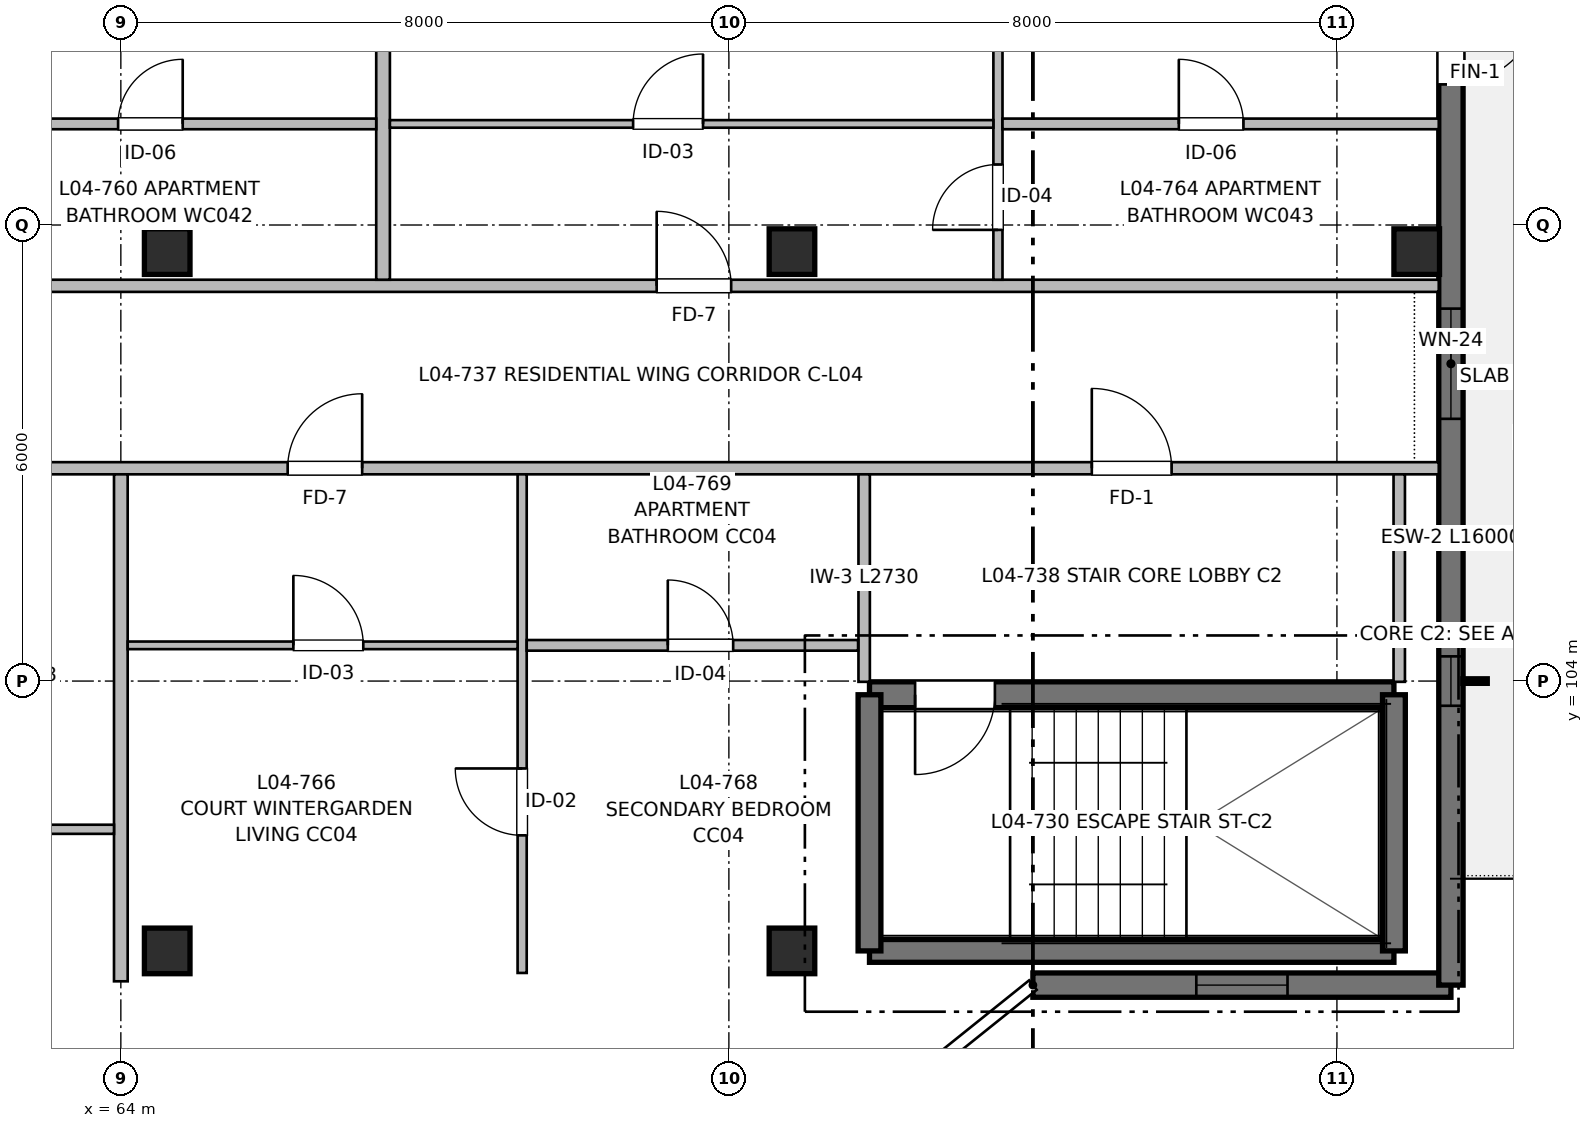
"""IFC4 building model, lengths in metres.
Left out: names, types, materials, properties, quantities, classifications, styles, units other than length and angle.
Written with IfcOpenShell. Run it as: python <this file> out.ifc"""

import sys

from ifc_helpers import new_model, si_unit, direction, frame, frame_2d, origin, origin_2d, place, context, subcontext, project, spatial, rectangle, extrude, element, fill, save


model = new_model("IFC4")
c1 = context("Model", 3, precision=1e-05, world=origin(), true_north=direction((0.0, 1.0)))
c2 = subcontext(c1, "Body", "Model", "MODEL_VIEW")
j1 = project(units=[si_unit("LENGTHUNIT", "METRE"), si_unit("PLANEANGLEUNIT", "RADIAN")], contexts=[c1])
p1 = place(None, origin())
s1 = spatial("IfcSite", under=j1, at=p1, CompositionType="ELEMENT")
p2 = place(p1, origin())
s2 = spatial("IfcBuilding", under=s1, at=p2, CompositionType="ELEMENT")
p3 = place(p2, frame((0.0, 0.0, 13.76)))
s3 = spatial("IfcBuildingStorey", under=s2, at=p3, CompositionType="ELEMENT", Elevation=13.76)
for number, where, z_axis, x_axis in (
    (1, (64.61, 100.45, 0.0), (0.0, 0.0, 1.0), (1.0, 0.0, 0.0)),
    (2, (64.61, 109.65, 0.0), (0.0, 0.0, 1.0), (1.0, 0.0, 0.0)),
    (3, (72.83, 100.45, 0.0), (0.0, 0.0, 1.0), (1.0, 0.0, 0.0)),
    (4, (72.83, 109.65, 0.0), (0.0, 0.0, 1.0), (1.0, 0.0, 0.0)),
    (5, (81.05, 109.65, 0.0), (0.0, 0.0, 1.0), (1.0, 0.0, 0.0)),
):
    element("IfcColumn", number, at=place(p3, frame(where, z_axis=z_axis, x_axis=x_axis)), inside=s3, PredefinedType="COLUMN", context=c2, shape_type="SweptSolid", body=[
        extrude(rectangle(XDim=0.6, YDim=0.6, at=origin_2d()), origin(), (0.0, 0.0, 1.0), 3.2),
    ])
p4 = place(p3, frame((73.85, 100.45, 0.0), z_axis=(0.0, 0.0, 1.0), x_axis=(1.0, 0.0, 0.0)))
e6 = element("IfcWall", 6, at=p4, inside=s3, PredefinedType="SHEAR", context=c2, shape_type="SweptSolid", body=[
    extrude(rectangle(XDim=6.9, YDim=0.3, at=frame_2d((3.45, 0.0))), origin(), (0.0, 0.0, 1.0), 3.2),
])
p5 = place(p3, frame((80.75, 103.82, 0.0), z_axis=(0.0, 0.0, 1.0), x_axis=(-1.0, 0.0, 0.0)))
e7 = element("IfcWall", 7, at=p5, inside=s3, PredefinedType="SHEAR", context=c2, shape_type="SweptSolid", body=[
    extrude(rectangle(XDim=6.9, YDim=0.34, at=frame_2d((3.45, 0.0))), origin(), (0.0, 0.0, 1.0), 3.2),
])
p6 = place(p5, frame((5.25, 0.0, 0.0)))
e8 = element("IfcOpeningElement", 8, at=p6, cuts=e7, PredefinedType="OPENING", context=c2, shape_type="SweptSolid", body=[
    extrude(rectangle(XDim=1.05, YDim=2.15, at=frame_2d((0.525, 1.075))), frame((0.0, 0.18, 0.0), z_axis=(0.0, -1.0, 0.0), x_axis=(1.0, 0.0, 0.0)), (0.0, 0.0, 1.0), 0.36),
])
for number, where, z_axis, x_axis in (
    (9, (73.85, 103.82, 0.0), (0.0, 0.0, 1.0), (0.0, -1.0, 0.0)),
    (10, (80.75, 100.45, 0.0), (0.0, 0.0, 1.0), (0.0, 1.0, 0.0)),
):
    element("IfcWall", number, at=place(p3, frame(where, z_axis=z_axis, x_axis=x_axis)), inside=s3, PredefinedType="SHEAR", context=c2, shape_type="SweptSolid", body=[
        extrude(rectangle(XDim=3.37, YDim=0.3, at=frame_2d((1.685, 0.0))), origin(), (0.0, 0.0, 1.0), 3.2),
    ])
p7 = place(p3, frame((81.5, 100.0, 0.0), z_axis=(0.0, 0.0, 1.0), x_axis=(-1.0, 0.0, 0.0)))
e11 = element("IfcWall", 11, at=p7, inside=s3, PredefinedType="SHEAR", context=c2, shape_type="SweptSolid", body=[
    extrude(rectangle(XDim=5.5, YDim=0.32, at=frame_2d((2.75, 0.0))), origin(), (0.0, 0.0, 1.0), 2.98),
])
p8 = place(p7, frame((2.15, 0.0, 0.9)))
e12 = element("IfcOpeningElement", 12, at=p8, cuts=e11, PredefinedType="OPENING", context=c2, shape_type="SweptSolid", body=[
    extrude(rectangle(XDim=1.2, YDim=1.05, at=frame_2d((0.6, 0.525))), frame((0.0, 0.17, 0.0), z_axis=(0.0, -1.0, 0.0), x_axis=(1.0, 0.0, 0.0)), (0.0, 0.0, 1.0), 0.34),
])
p9 = place(p3, frame((81.5, 116.0, 0.0), z_axis=(0.0, 0.0, 1.0), x_axis=(0.0, -1.0, 0.0)))
e13 = element("IfcWall", 13, at=p9, inside=s3, PredefinedType="SHEAR", context=c2, shape_type="SweptSolid", body=[
    extrude(rectangle(XDim=16.0, YDim=0.32, at=frame_2d((8.0, 0.0))), origin(), (0.0, 0.0, 1.0), 2.98),
])
p10 = place(p9, frame((2.95, 0.0, 0.0)))
e14 = element("IfcOpeningElement", 14, at=p10, cuts=e13, PredefinedType="OPENING", context=c2, shape_type="SweptSolid", body=[
    extrude(rectangle(XDim=1.2, YDim=2.2, at=frame_2d((0.6, 1.1))), frame((0.0, 0.17, 0.0), z_axis=(0.0, -1.0, 0.0), x_axis=(1.0, 0.0, 0.0)), (0.0, 0.0, 1.0), 0.34),
])
p11 = place(p9, frame((7.1, 0.0, 0.77)))
e15 = element("IfcOpeningElement", 15, at=p11, cuts=e13, PredefinedType="OPENING", context=c2, shape_type="SweptSolid", body=[
    extrude(rectangle(XDim=1.45, YDim=1.45, at=frame_2d((0.725, 0.725))), frame((0.0, 0.17, 0.0), z_axis=(0.0, -1.0, 0.0), x_axis=(1.0, 0.0, 0.0)), (0.0, 0.0, 1.0), 0.34),
])
p12 = place(p9, frame((11.675, 0.0, 0.9)))
e16 = element("IfcOpeningElement", 16, at=p12, cuts=e13, PredefinedType="OPENING", context=c2, shape_type="SweptSolid", body=[
    extrude(rectangle(XDim=0.65, YDim=0.95, at=frame_2d((0.325, 0.475))), frame((0.0, 0.17, 0.0), z_axis=(0.0, -1.0, 0.0), x_axis=(1.0, 0.0, 0.0)), (0.0, 0.0, 1.0), 0.34),
])
p13 = place(p3, frame((57.2, 106.8, 0.0), z_axis=(0.0, 0.0, 1.0), x_axis=(1.0, 0.0, 0.0)))
e17 = element("IfcWall", 17, at=p13, inside=s3, PredefinedType="PARTITIONING", context=c2, shape_type="SweptSolid", body=[
    extrude(rectangle(XDim=24.14, YDim=0.16, at=frame_2d((12.07, 0.0))), origin(), (0.0, 0.0, 1.0), 2.935),
])
p14 = place(p13, frame((19.575, 0.0, 0.0)))
e18 = element("IfcOpeningElement", 18, at=p14, cuts=e17, PredefinedType="OPENING", context=c2, shape_type="SweptSolid", body=[
    extrude(rectangle(XDim=1.05, YDim=2.15, at=frame_2d((0.525, 1.075))), frame((0.0, 0.09, 0.0), z_axis=(0.0, -1.0, 0.0), x_axis=(1.0, 0.0, 0.0)), (0.0, 0.0, 1.0), 0.18),
])
p15 = place(p13, frame((8.995, 0.0, 0.0)))
e19 = element("IfcOpeningElement", 19, at=p15, cuts=e17, PredefinedType="OPENING", context=c2, shape_type="SweptSolid", body=[
    extrude(rectangle(XDim=0.98, YDim=2.15, at=frame_2d((0.49, 1.075))), frame((0.0, 0.09, 0.0), z_axis=(0.0, -1.0, 0.0), x_axis=(1.0, 0.0, 0.0)), (0.0, 0.0, 1.0), 0.18),
])
p16 = place(p3, frame((39.66, 109.2, 0.0), z_axis=(0.0, 0.0, 1.0), x_axis=(1.0, 0.0, 0.0)))
e20 = element("IfcWall", 20, at=p16, inside=s3, PredefinedType="PARTITIONING", context=c2, shape_type="SweptSolid", body=[
    extrude(rectangle(XDim=41.68, YDim=0.16, at=frame_2d((20.84, 0.0))), origin(), (0.0, 0.0, 1.0), 2.935),
])
p17 = place(p16, frame((3.51, 0.0, 0.0)))
e21 = element("IfcOpeningElement", 21, at=p17, cuts=e20, PredefinedType="OPENING", context=c2, shape_type="SweptSolid", body=[
    extrude(rectangle(XDim=0.98, YDim=2.15, at=frame_2d((0.49, 1.075))), frame((0.0, 0.09, 0.0), z_axis=(0.0, -1.0, 0.0), x_axis=(1.0, 0.0, 0.0)), (0.0, 0.0, 1.0), 0.18),
])
p18 = place(p16, frame((17.47, 0.0, 0.0)))
e22 = element("IfcOpeningElement", 22, at=p18, cuts=e20, PredefinedType="OPENING", context=c2, shape_type="SweptSolid", body=[
    extrude(rectangle(XDim=0.98, YDim=2.15, at=frame_2d((0.49, 1.075))), frame((0.0, 0.09, 0.0), z_axis=(0.0, -1.0, 0.0), x_axis=(1.0, 0.0, 0.0)), (0.0, 0.0, 1.0), 0.18),
])
p19 = place(p16, frame((31.39, 0.0, 0.0)))
e23 = element("IfcOpeningElement", 23, at=p19, cuts=e20, PredefinedType="OPENING", context=c2, shape_type="SweptSolid", body=[
    extrude(rectangle(XDim=0.98, YDim=2.15, at=frame_2d((0.49, 1.075))), frame((0.0, 0.09, 0.0), z_axis=(0.0, -1.0, 0.0), x_axis=(1.0, 0.0, 0.0)), (0.0, 0.0, 1.0), 0.18),
])
p20 = place(p3, frame((64.0, 100.05, 0.0), z_axis=(0.0, 0.0, 1.0), x_axis=(0.0, 1.0, 0.0)))
e24 = element("IfcWall", 24, at=p20, inside=s3, PredefinedType="PARTITIONING", context=c2, shape_type="SweptSolid", body=[
    extrude(rectangle(XDim=6.67, YDim=0.18, at=frame_2d((3.335, 0.0))), origin(), (0.0, 0.0, 1.0), 2.935),
])
for number, where, z_axis, x_axis in (
    (25, (73.78, 103.99, 0.0), (0.0, 0.0, 1.0), (0.0, 1.0, 0.0)),
    (26, (80.82, 103.99, 0.0), (0.0, 0.0, 1.0), (0.0, 1.0, 0.0)),
):
    element("IfcWall", number, at=place(p3, frame(where, z_axis=z_axis, x_axis=x_axis)), inside=s3, PredefinedType="PARTITIONING", context=c2, shape_type="SweptSolid", body=[
        extrude(rectangle(XDim=2.73, YDim=0.15, at=frame_2d((1.365, 0.0))), origin(), (0.0, 0.0, 1.0), 2.935),
    ])
p21 = place(p3, frame((59.72, 102.05, 0.0), z_axis=(0.0, 0.0, 1.0), x_axis=(1.0, 0.0, 0.0)))
e27 = element("IfcWall", 27, at=p21, inside=s3, PredefinedType="PARTITIONING", context=c2, shape_type="SweptSolid", body=[
    extrude(rectangle(XDim=4.19, YDim=0.12, at=frame_2d((2.095, 0.0))), origin(), (0.0, 0.0, 1.0), 2.935),
])
p22 = place(p21, frame((1.655, 0.0, 0.0)))
e28 = element("IfcOpeningElement", 28, at=p22, cuts=e27, PredefinedType="OPENING", context=c2, shape_type="SweptSolid", body=[
    extrude(rectangle(XDim=0.88, YDim=2.1, at=frame_2d((0.44, 1.05))), frame((0.0, 0.07, 0.0), z_axis=(0.0, -1.0, 0.0), x_axis=(1.0, 0.0, 0.0)), (0.0, 0.0, 1.0), 0.14),
])
p23 = place(p3, frame((67.45, 109.28, 0.0), z_axis=(0.0, 0.0, 1.0), x_axis=(0.0, 1.0, 0.0)))
e29 = element("IfcWall", 29, at=p23, inside=s3, PredefinedType="PARTITIONING", context=c2, shape_type="SweptSolid", body=[
    extrude(rectangle(XDim=6.6, YDim=0.18, at=frame_2d((3.3, 0.0))), origin(), (0.0, 0.0, 1.0), 2.935),
])
p24 = place(p3, frame((61.66, 111.33, 0.0), z_axis=(0.0, 0.0, 1.0), x_axis=(1.0, 0.0, 0.0)))
e30 = element("IfcWall", 30, at=p24, inside=s3, PredefinedType="PARTITIONING", context=c2, shape_type="SweptSolid", body=[
    extrude(rectangle(XDim=5.7, YDim=0.14, at=frame_2d((2.85, 0.0))), origin(), (0.0, 0.0, 1.0), 2.935),
])
p25 = place(p24, frame((2.304, 0.0, 0.0)))
e31 = element("IfcOpeningElement", 31, at=p25, cuts=e30, PredefinedType="OPENING", context=c2, shape_type="SweptSolid", body=[
    extrude(rectangle(XDim=0.85, YDim=2.05, at=frame_2d((0.425, 1.025))), frame((0.0, 0.08, 0.0), z_axis=(0.0, -1.0, 0.0), x_axis=(1.0, 0.0, 0.0)), (0.0, 0.0, 1.0), 0.16),
])
p26 = place(p3, frame((75.54, 109.28, 0.0), z_axis=(0.0, 0.0, 1.0), x_axis=(0.0, 1.0, 0.0)))
e32 = element("IfcWall", 32, at=p26, inside=s3, PredefinedType="PARTITIONING", context=c2, shape_type="SweptSolid", body=[
    extrude(rectangle(XDim=6.6, YDim=0.12, at=frame_2d((3.3, 0.0))), origin(), (0.0, 0.0, 1.0), 2.935),
])
p27 = place(p26, frame((0.656, 0.0, 0.0)))
e33 = element("IfcOpeningElement", 33, at=p27, cuts=e32, PredefinedType="OPENING", context=c2, shape_type="SweptSolid", body=[
    extrude(rectangle(XDim=0.86, YDim=2.1, at=frame_2d((0.43, 1.05))), frame((0.0, 0.07, 0.0), z_axis=(0.0, -1.0, 0.0), x_axis=(1.0, 0.0, 0.0)), (0.0, 0.0, 1.0), 0.14),
])
p28 = place(p26, frame((4.097, 0.0, 0.0)))
e34 = element("IfcOpeningElement", 34, at=p28, cuts=e32, PredefinedType="OPENING", context=c2, shape_type="SweptSolid", body=[
    extrude(rectangle(XDim=0.9, YDim=2.1, at=frame_2d((0.45, 1.05))), frame((0.0, 0.07, 0.0), z_axis=(0.0, -1.0, 0.0), x_axis=(1.0, 0.0, 0.0)), (0.0, 0.0, 1.0), 0.14),
])
p29 = place(p3, frame((75.6, 111.33, 0.0), z_axis=(0.0, 0.0, 1.0), x_axis=(1.0, 0.0, 0.0)))
e35 = element("IfcWall", 35, at=p29, inside=s3, PredefinedType="PARTITIONING", context=c2, shape_type="SweptSolid", body=[
    extrude(rectangle(XDim=5.74, YDim=0.14, at=frame_2d((2.87, 0.0))), origin(), (0.0, 0.0, 1.0), 2.935),
])
p30 = place(p29, frame((2.32, 0.0, 0.0)))
e36 = element("IfcOpeningElement", 36, at=p30, cuts=e35, PredefinedType="OPENING", context=c2, shape_type="SweptSolid", body=[
    extrude(rectangle(XDim=0.85, YDim=2.05, at=frame_2d((0.425, 1.025))), frame((0.0, 0.08, 0.0), z_axis=(0.0, -1.0, 0.0), x_axis=(1.0, 0.0, 0.0)), (0.0, 0.0, 1.0), 0.16),
])
p31 = place(p3, frame((67.54, 111.33, 0.0), z_axis=(0.0, 0.0, 1.0), x_axis=(1.0, 0.0, 0.0)))
e37 = element("IfcWall", 37, at=p31, inside=s3, PredefinedType="PARTITIONING", context=c2, shape_type="SweptSolid", body=[
    extrude(rectangle(XDim=7.94, YDim=0.1, at=frame_2d((3.97, 0.0))), origin(), (0.0, 0.0, 1.0), 2.935),
])
p32 = place(p31, frame((3.2, 0.0, 0.0)))
e38 = element("IfcOpeningElement", 38, at=p32, cuts=e37, PredefinedType="OPENING", context=c2, shape_type="SweptSolid", body=[
    extrude(rectangle(XDim=0.92, YDim=2.1, at=frame_2d((0.46, 1.05))), frame((0.0, 0.06, 0.0), z_axis=(0.0, -1.0, 0.0), x_axis=(1.0, 0.0, 0.0)), (0.0, 0.0, 1.0), 0.12),
])
p33 = place(p3, frame((69.28, 100.16, 0.0), z_axis=(0.0, 0.0, 1.0), x_axis=(0.0, 1.0, 0.0)))
e39 = element("IfcWall", 39, at=p33, inside=s3, PredefinedType="PARTITIONING", context=c2, shape_type="SweptSolid", body=[
    extrude(rectangle(XDim=6.56, YDim=0.12, at=frame_2d((3.28, 0.0))), origin(), (0.0, 0.0, 1.0), 2.935),
])
p34 = place(p33, frame((1.81, 0.0, 0.0)))
e40 = element("IfcOpeningElement", 40, at=p34, cuts=e39, PredefinedType="OPENING", context=c2, shape_type="SweptSolid", body=[
    extrude(rectangle(XDim=0.88, YDim=2.1, at=frame_2d((0.44, 1.05))), frame((0.0, 0.07, 0.0), z_axis=(0.0, -1.0, 0.0), x_axis=(1.0, 0.0, 0.0)), (0.0, 0.0, 1.0), 0.14),
])
p35 = place(p3, frame((69.34, 104.47, 0.0), z_axis=(0.0, 0.0, 1.0), x_axis=(1.0, 0.0, 0.0)))
e41 = element("IfcWall", 41, at=p35, inside=s3, PredefinedType="PARTITIONING", context=c2, shape_type="SweptSolid", body=[
    extrude(rectangle(XDim=4.36, YDim=0.14, at=frame_2d((2.18, 0.0))), origin(), (0.0, 0.0, 1.0), 2.935),
])
p36 = place(p35, frame((1.856, 0.0, 0.0)))
e42 = element("IfcOpeningElement", 42, at=p36, cuts=e41, PredefinedType="OPENING", context=c2, shape_type="SweptSolid", body=[
    extrude(rectangle(XDim=0.86, YDim=2.1, at=frame_2d((0.43, 1.05))), frame((0.0, 0.08, 0.0), z_axis=(0.0, -1.0, 0.0), x_axis=(1.0, 0.0, 0.0)), (0.0, 0.0, 1.0), 0.16),
])
p37 = place(p3, frame((64.09, 104.47, 0.0), z_axis=(0.0, 0.0, 1.0), x_axis=(1.0, 0.0, 0.0)))
e43 = element("IfcWall", 43, at=p37, inside=s3, PredefinedType="PARTITIONING", context=c2, shape_type="SweptSolid", body=[
    extrude(rectangle(XDim=5.13, YDim=0.1, at=frame_2d((2.565, 0.0))), origin(), (0.0, 0.0, 1.0), 2.935),
])
p38 = place(p37, frame((2.18, 0.0, 0.0)))
e44 = element("IfcOpeningElement", 44, at=p38, cuts=e43, PredefinedType="OPENING", context=c2, shape_type="SweptSolid", body=[
    extrude(rectangle(XDim=0.92, YDim=2.1, at=frame_2d((0.46, 1.05))), frame((0.0, 0.06, 0.0), z_axis=(0.0, -1.0, 0.0), x_axis=(1.0, 0.0, 0.0)), (0.0, 0.0, 1.0), 0.12),
])
p39 = place(p6, origin())
e45 = element("IfcDoor", 45, at=p39, inside=s3, OperationType="SINGLE_SWING_RIGHT", PredefinedType="DOOR", context=c2, shape_type="SweptSolid", body=[
    extrude(rectangle(XDim=1.05, YDim=2.15, at=frame_2d((0.525, 1.075))), frame((0.0, 0.025, 0.0), z_axis=(0.0, -1.0, 0.0), x_axis=(1.0, 0.0, 0.0)), (0.0, 0.0, 1.0), 0.05),
])
fill(e8, e45)
p40 = place(p8, origin())
e46 = element("IfcWindow", 46, at=p40, inside=s3, PartitioningType="SINGLE_PANEL", PredefinedType="WINDOW", context=c2, shape_type="SweptSolid", body=[
    extrude(rectangle(XDim=1.2, YDim=1.05, at=frame_2d((0.6, 0.525))), frame((0.0, 0.03, 0.0), z_axis=(0.0, -1.0, 0.0), x_axis=(1.0, 0.0, 0.0)), (0.0, 0.0, 1.0), 0.06),
])
fill(e12, e46)
p41 = place(p10, origin())
e47 = element("IfcDoor", 47, at=p41, inside=s3, OperationType="SINGLE_SWING_LEFT", PredefinedType="DOOR", context=c2, shape_type="SweptSolid", body=[
    extrude(rectangle(XDim=1.2, YDim=2.2, at=frame_2d((0.6, 1.1))), frame((0.0, 0.025, 0.0), z_axis=(0.0, -1.0, 0.0), x_axis=(1.0, 0.0, 0.0)), (0.0, 0.0, 1.0), 0.05),
])
fill(e14, e47)
p42 = place(p11, origin())
e48 = element("IfcWindow", 48, at=p42, inside=s3, PartitioningType="SINGLE_PANEL", PredefinedType="WINDOW", context=c2, shape_type="SweptSolid", body=[
    extrude(rectangle(XDim=1.45, YDim=1.45, at=frame_2d((0.725, 0.725))), frame((0.0, 0.03, 0.0), z_axis=(0.0, -1.0, 0.0), x_axis=(1.0, 0.0, 0.0)), (0.0, 0.0, 1.0), 0.06),
])
fill(e15, e48)
p43 = place(p12, origin())
e49 = element("IfcWindow", 49, at=p43, inside=s3, PartitioningType="SINGLE_PANEL", PredefinedType="WINDOW", context=c2, shape_type="SweptSolid", body=[
    extrude(rectangle(XDim=0.65, YDim=0.95, at=frame_2d((0.325, 0.475))), frame((0.0, 0.03, 0.0), z_axis=(0.0, -1.0, 0.0), x_axis=(1.0, 0.0, 0.0)), (0.0, 0.0, 1.0), 0.06),
])
fill(e16, e49)
p44 = place(p14, origin())
e50 = element("IfcDoor", 50, at=p44, inside=s3, OperationType="SINGLE_SWING_LEFT", PredefinedType="DOOR", context=c2, shape_type="SweptSolid", body=[
    extrude(rectangle(XDim=1.05, YDim=2.15, at=frame_2d((0.525, 1.075))), frame((0.0, 0.025, 0.0), z_axis=(0.0, -1.0, 0.0), x_axis=(1.0, 0.0, 0.0)), (0.0, 0.0, 1.0), 0.05),
])
fill(e18, e50)
p45 = place(p25, origin())
e51 = element("IfcDoor", 51, at=p45, inside=s3, OperationType="SINGLE_SWING_RIGHT", PredefinedType="DOOR", context=c2, shape_type="SweptSolid", body=[
    extrude(rectangle(XDim=0.85, YDim=2.05, at=frame_2d((0.425, 1.025))), frame((0.0, 0.025, 0.0), z_axis=(0.0, -1.0, 0.0), x_axis=(1.0, 0.0, 0.0)), (0.0, 0.0, 1.0), 0.05),
])
fill(e31, e51)
p46 = place(p19, origin())
e52 = element("IfcDoor", 52, at=p46, inside=s3, OperationType="SINGLE_SWING_LEFT", PredefinedType="DOOR", context=c2, shape_type="SweptSolid", body=[
    extrude(rectangle(XDim=0.98, YDim=2.15, at=frame_2d((0.49, 1.075))), frame((0.0, 0.025, 0.0), z_axis=(0.0, -1.0, 0.0), x_axis=(1.0, 0.0, 0.0)), (0.0, 0.0, 1.0), 0.05),
])
fill(e23, e52)
p47 = place(p32, origin())
e53 = element("IfcDoor", 53, at=p47, inside=s3, OperationType="SINGLE_SWING_RIGHT", PredefinedType="DOOR", context=c2, shape_type="SweptSolid", body=[
    extrude(rectangle(XDim=0.92, YDim=2.1, at=frame_2d((0.46, 1.05))), frame((0.0, 0.025, 0.0), z_axis=(0.0, -1.0, 0.0), x_axis=(1.0, 0.0, 0.0)), (0.0, 0.0, 1.0), 0.05),
])
fill(e38, e53)
p48 = place(p27, origin())
e54 = element("IfcDoor", 54, at=p48, inside=s3, OperationType="SINGLE_SWING_LEFT", PredefinedType="DOOR", context=c2, shape_type="SweptSolid", body=[
    extrude(rectangle(XDim=0.86, YDim=2.1, at=frame_2d((0.43, 1.05))), frame((0.0, 0.025, 0.0), z_axis=(0.0, -1.0, 0.0), x_axis=(1.0, 0.0, 0.0)), (0.0, 0.0, 1.0), 0.05),
])
fill(e33, e54)
p49 = place(p30, origin())
e55 = element("IfcDoor", 55, at=p49, inside=s3, OperationType="SINGLE_SWING_LEFT", PredefinedType="DOOR", context=c2, shape_type="SweptSolid", body=[
    extrude(rectangle(XDim=0.85, YDim=2.05, at=frame_2d((0.425, 1.025))), frame((0.0, 0.025, 0.0), z_axis=(0.0, -1.0, 0.0), x_axis=(1.0, 0.0, 0.0)), (0.0, 0.0, 1.0), 0.05),
])
fill(e36, e55)
p50 = place(p15, origin())
e56 = element("IfcDoor", 56, at=p50, inside=s3, OperationType="SINGLE_SWING_RIGHT", PredefinedType="DOOR", context=c2, shape_type="SweptSolid", body=[
    extrude(rectangle(XDim=0.98, YDim=2.15, at=frame_2d((0.49, 1.075))), frame((0.0, 0.025, 0.0), z_axis=(0.0, -1.0, 0.0), x_axis=(1.0, 0.0, 0.0)), (0.0, 0.0, 1.0), 0.05),
])
fill(e19, e56)
p51 = place(p38, origin())
e57 = element("IfcDoor", 57, at=p51, inside=s3, OperationType="SINGLE_SWING_LEFT", PredefinedType="DOOR", context=c2, shape_type="SweptSolid", body=[
    extrude(rectangle(XDim=0.92, YDim=2.1, at=frame_2d((0.46, 1.05))), frame((0.0, 0.025, 0.0), z_axis=(0.0, -1.0, 0.0), x_axis=(1.0, 0.0, 0.0)), (0.0, 0.0, 1.0), 0.05),
])
fill(e44, e57)
p52 = place(p34, origin())
e58 = element("IfcDoor", 58, at=p52, inside=s3, OperationType="SINGLE_SWING_RIGHT", PredefinedType="DOOR", context=c2, shape_type="SweptSolid", body=[
    extrude(rectangle(XDim=0.88, YDim=2.1, at=frame_2d((0.44, 1.05))), frame((0.0, 0.025, 0.0), z_axis=(0.0, -1.0, 0.0), x_axis=(1.0, 0.0, 0.0)), (0.0, 0.0, 1.0), 0.05),
])
fill(e40, e58)
p53 = place(p36, origin())
e59 = element("IfcDoor", 59, at=p53, inside=s3, OperationType="SINGLE_SWING_LEFT", PredefinedType="DOOR", context=c2, shape_type="SweptSolid", body=[
    extrude(rectangle(XDim=0.86, YDim=2.1, at=frame_2d((0.43, 1.05))), frame((0.0, 0.025, 0.0), z_axis=(0.0, -1.0, 0.0), x_axis=(1.0, 0.0, 0.0)), (0.0, 0.0, 1.0), 0.05),
])
fill(e42, e59)
save(model, sys.argv[1])
